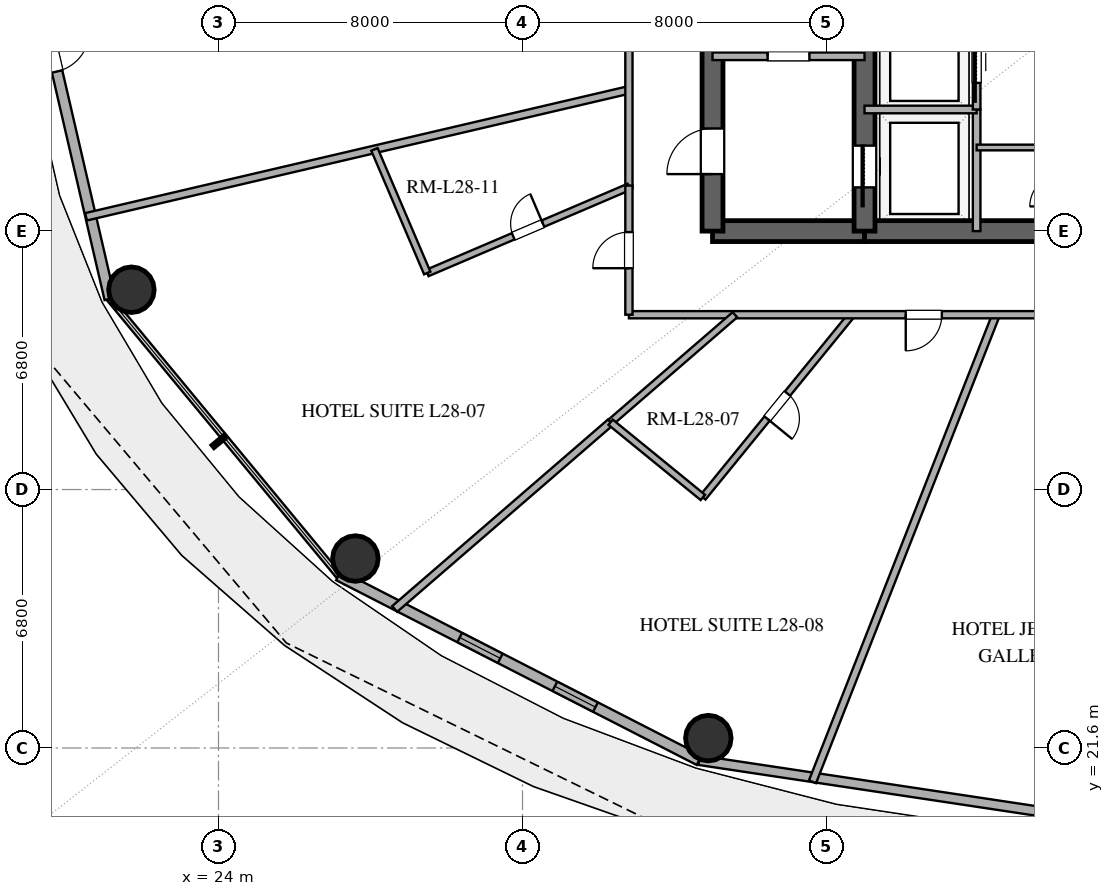
"""IFC4 building model, lengths in metres.
Left out: names, types, materials, properties, quantities, classifications, styles, units other than length and angle.
Written with IfcOpenShell. Run it as: python <this file> out.ifc"""

import sys

from ifc_helpers import new_model, si_unit, direction, frame, frame_2d, origin, origin_2d, place, context, subcontext, project, spatial, rectangle, hollow_circle, extrude, element, fill, save


model = new_model("IFC4")
c1 = context("Model", 3, precision=1e-05, world=origin(), true_north=direction((0.0, 1.0)))
c2 = subcontext(c1, "Body", "Model", "MODEL_VIEW")
j1 = project(units=[si_unit("LENGTHUNIT", "METRE"), si_unit("PLANEANGLEUNIT", "RADIAN")], contexts=[c1])
p1 = place(None, origin())
s1 = spatial("IfcSite", under=j1, at=p1, CompositionType="ELEMENT")
p2 = place(p1, origin())
s2 = spatial("IfcBuilding", under=s1, at=p2, CompositionType="ELEMENT")
p3 = place(p2, frame((0.0, 0.0, 112.8)))
s3 = spatial("IfcBuildingStorey", under=s2, at=p3, CompositionType="ELEMENT", Elevation=112.8)
p4 = place(p3, frame((37.0, 35.2, 0.0), z_axis=(0.0, 0.0, 1.0), x_axis=(1.0, 0.0, 0.0)))
e1 = element("IfcWall", 1, at=p4, inside=s3, PredefinedType="SHEAR", context=c2, shape_type="SweptSolid", body=[
    extrude(rectangle(XDim=4.0, YDim=0.55, at=frame_2d((2.0, 0.0))), origin(), (0.0, 0.0, 1.0), 3.38),
])
p5 = place(p3, frame((41.0, 35.2, 0.0), z_axis=(0.0, 0.0, 1.0), x_axis=(1.0, 0.0, 0.0)))
e2 = element("IfcWall", 2, at=p5, inside=s3, PredefinedType="SHEAR", context=c2, shape_type="SweptSolid", body=[
    extrude(rectangle(XDim=14.0, YDim=0.55, at=frame_2d((7.0, 0.0))), origin(), (0.0, 0.0, 1.0), 3.38),
])
p6 = place(p5, frame((6.1, 0.0, 0.0)))
e3 = element("IfcOpeningElement", 3, at=p6, cuts=e2, PredefinedType="OPENING", context=c2, shape_type="SweptSolid", body=[
    extrude(rectangle(XDim=1.8, YDim=2.25, at=frame_2d((0.9, 1.125))), frame((0.0, 0.285, 0.0), z_axis=(0.0, -1.0, 0.0), x_axis=(1.0, 0.0, 0.0)), (0.0, 0.0, 1.0), 0.57),
])
p7 = place(p3, frame((37.0, 35.2, 0.0), z_axis=(0.0, 0.0, 1.0), x_axis=(0.0, 1.0, 0.0)))
e4 = element("IfcWall", 4, at=p7, inside=s3, PredefinedType="SHEAR", context=c2, shape_type="SweptSolid", body=[
    extrude(rectangle(XDim=13.6, YDim=0.55, at=frame_2d((6.8, 0.0))), origin(), (0.0, 0.0, 1.0), 3.38),
])
p8 = place(p7, frame((1.5, 0.0, 0.0)))
e5 = element("IfcOpeningElement", 5, at=p8, cuts=e4, PredefinedType="OPENING", context=c2, shape_type="SweptSolid", body=[
    extrude(rectangle(XDim=1.2, YDim=2.15, at=frame_2d((0.6, 1.075))), frame((0.0, 0.285, 0.0), z_axis=(0.0, -1.0, 0.0), x_axis=(1.0, 0.0, 0.0)), (0.0, 0.0, 1.0), 0.57),
])
p9 = place(p3, frame((41.0, 35.2, 0.0), z_axis=(0.0, 0.0, 1.0), x_axis=(0.0, 1.0, 0.0)))
e6 = element("IfcWall", 6, at=p9, inside=s3, PredefinedType="SHEAR", context=c2, shape_type="SweptSolid", body=[
    extrude(rectangle(XDim=13.6, YDim=0.55, at=frame_2d((6.8, 0.0))), origin(), (0.0, 0.0, 1.0), 3.38),
])
p10 = place(p9, frame((1.15, 0.0, 0.0)))
e7 = element("IfcOpeningElement", 7, at=p10, cuts=e6, PredefinedType="OPENING", context=c2, shape_type="SweptSolid", body=[
    extrude(rectangle(XDim=1.1, YDim=2.2, at=frame_2d((0.55, 1.1))), frame((0.0, 0.285, 0.0), z_axis=(0.0, -1.0, 0.0), x_axis=(1.0, 0.0, 0.0)), (0.0, 0.0, 1.0), 0.57),
])
for number, where, z_axis, x_axis in (
    (8, (21.709, 33.657, 0.0), (0.0, 0.0, 1.0), (1.0, 0.0, 0.0)),
    (9, (27.602, 26.585, 0.0), (0.0, 0.0, 1.0), (1.0, 0.0, 0.0)),
    (10, (36.89, 21.859, 0.0), (0.0, 0.0, 1.0), (1.0, 0.0, 0.0)),
):
    element("IfcColumn", number, at=place(p3, frame(where, z_axis=z_axis, x_axis=x_axis)), inside=s3, PredefinedType="COLUMN", context=c2, shape_type="SweptSolid", body=[
        extrude(hollow_circle(Radius=0.6, WallThickness=0.032, at=origin_2d()), origin(), (0.0, 0.0, 1.0), 3.38),
    ])
p11 = place(p3, frame((19.151, 42.0, 0.0), z_axis=(0.0, 0.0, 1.0), x_axis=(0.22558597182, -0.974223264616, 0.0)))
e11 = element("IfcWall", 11, at=p11, inside=s3, PredefinedType="SOLIDWALL", context=c2, shape_type="SweptSolid", body=[
    extrude(rectangle(XDim=8.811, YDim=0.28, at=frame_2d((4.405, 0.0))), origin(), (0.0, 0.0, 1.0), 3.38),
])
p12 = place(p11, frame((1.568, 0.0, 0.0)))
e12 = element("IfcOpeningElement", 12, at=p12, cuts=e11, PredefinedType="OPENING", context=c2, shape_type="SweptSolid", body=[
    extrude(rectangle(XDim=1.1, YDim=2.25, at=frame_2d((0.55, 1.125))), frame((0.0, 0.15, 0.0), z_axis=(0.0, -1.0, 0.0), x_axis=(1.0, 0.0, 0.0)), (0.0, 0.0, 1.0), 0.3),
])
p13 = place(p3, frame((27.16, 26.14, 0.0), z_axis=(0.0, 0.0, 1.0), x_axis=(0.889959505023, -0.45603955905, 0.0)))
e13 = element("IfcWall", 13, at=p13, inside=s3, PredefinedType="SOLIDWALL", context=c2, shape_type="SweptSolid", body=[
    extrude(rectangle(XDim=10.662, YDim=0.28, at=frame_2d((5.331, 0.0))), origin(), (0.0, 0.0, 1.0), 3.38),
])
p14 = place(p13, frame((3.581, 0.0, 0.85)))
e14 = element("IfcOpeningElement", 14, at=p14, cuts=e13, PredefinedType="OPENING", context=c2, shape_type="SweptSolid", body=[
    extrude(rectangle(XDim=1.2, YDim=1.6, at=frame_2d((0.6, 0.8))), frame((0.0, 0.15, 0.0), z_axis=(0.0, -1.0, 0.0), x_axis=(1.0, 0.0, 0.0)), (0.0, 0.0, 1.0), 0.3),
])
p15 = place(p13, frame((6.396, 0.0, 0.85)))
e15 = element("IfcOpeningElement", 15, at=p15, cuts=e13, PredefinedType="OPENING", context=c2, shape_type="SweptSolid", body=[
    extrude(rectangle(XDim=1.2, YDim=1.6, at=frame_2d((0.6, 0.8))), frame((0.0, 0.15, 0.0), z_axis=(0.0, -1.0, 0.0), x_axis=(1.0, 0.0, 0.0)), (0.0, 0.0, 1.0), 0.3),
])
p16 = place(p3, frame((36.649, 21.277, 0.0), z_axis=(0.0, 0.0, 1.0), x_axis=(0.988877774656, -0.148730450117, 0.0)))
e16 = element("IfcWall", 16, at=p16, inside=s3, PredefinedType="SOLIDWALL", context=c2, shape_type="SweptSolid", body=[
    extrude(rectangle(XDim=11.479, YDim=0.25, at=frame_2d((5.74, 0.0))), origin(), (0.0, 0.0, 1.0), 3.38),
])
p17 = place(p3, frame((37.0, 39.8, 0.0), z_axis=(0.0, 0.0, 1.0), x_axis=(1.0, 0.0, 0.0)))
e17 = element("IfcWall", 17, at=p17, inside=s3, PredefinedType="SOLIDWALL", context=c2, shape_type="SweptSolid", body=[
    extrude(rectangle(XDim=4.0, YDim=0.2, at=frame_2d((2.0, 0.0))), origin(), (0.0, 0.0, 1.0), 2.74),
])
p18 = place(p17, frame((1.45, 0.0, 0.0)))
e18 = element("IfcOpeningElement", 18, at=p18, cuts=e17, PredefinedType="OPENING", context=c2, shape_type="SweptSolid", body=[
    extrude(rectangle(XDim=1.1, YDim=2.15, at=frame_2d((0.55, 1.075))), frame((0.0, 0.11, 0.0), z_axis=(0.0, -1.0, 0.0), x_axis=(1.0, 0.0, 0.0)), (0.0, 0.0, 1.0), 0.22),
])
p19 = place(p3, frame((43.95, 35.2, 0.0), z_axis=(0.0, 0.0, 1.0), x_axis=(0.0, 1.0, 0.0)))
e19 = element("IfcWall", 19, at=p19, inside=s3, PredefinedType="SOLIDWALL", context=c2, shape_type="SweptSolid", body=[
    extrude(rectangle(XDim=3.2, YDim=0.2, at=frame_2d((1.6, 0.0))), origin(), (0.0, 0.0, 1.0), 2.74),
])
p20 = place(p3, frame((41.0, 38.4, 0.0), z_axis=(0.0, 0.0, 1.0), x_axis=(1.0, 0.0, 0.0)))
e20 = element("IfcWall", 20, at=p20, inside=s3, PredefinedType="SOLIDWALL", context=c2, shape_type="SweptSolid", body=[
    extrude(rectangle(XDim=2.95, YDim=0.2, at=frame_2d((1.475, 0.0))), origin(), (0.0, 0.0, 1.0), 2.74),
])
p21 = place(p3, frame((43.95, 38.4, 0.0), z_axis=(0.0, 0.0, 1.0), x_axis=(0.0, 1.0, 0.0)))
e21 = element("IfcWall", 21, at=p21, inside=s3, PredefinedType="SOLIDWALL", context=c2, shape_type="SweptSolid", body=[
    extrude(rectangle(XDim=7.8, YDim=0.2, at=frame_2d((3.9, 0.0))), origin(), (0.0, 0.0, 1.0), 2.74),
])
p22 = place(p21, frame((0.7, 0.0, 0.0)))
e22 = element("IfcOpeningElement", 22, at=p22, cuts=e21, PredefinedType="OPENING", context=c2, shape_type="SweptSolid", body=[
    extrude(rectangle(XDim=1.1, YDim=2.2, at=frame_2d((0.55, 1.1))), frame((0.0, 0.11, 0.0), z_axis=(0.0, -1.0, 0.0), x_axis=(1.0, 0.0, 0.0)), (0.0, 0.0, 1.0), 0.22),
])
p23 = place(p21, frame((3.3, 0.0, 0.0)))
e23 = element("IfcOpeningElement", 23, at=p23, cuts=e21, PredefinedType="OPENING", context=c2, shape_type="SweptSolid", body=[
    extrude(rectangle(XDim=1.1, YDim=2.2, at=frame_2d((0.55, 1.1))), frame((0.0, 0.11, 0.0), z_axis=(0.0, -1.0, 0.0), x_axis=(1.0, 0.0, 0.0)), (0.0, 0.0, 1.0), 0.22),
])
p24 = place(p3, frame((43.95, 37.4, 0.0), z_axis=(0.0, 0.0, 1.0), x_axis=(1.0, 0.0, 0.0)))
e24 = element("IfcWall", 24, at=p24, inside=s3, PredefinedType="PARTITIONING", context=c2, shape_type="SweptSolid", body=[
    extrude(rectangle(XDim=2.25, YDim=0.15, at=frame_2d((1.125, 0.0))), origin(), (0.0, 0.0, 1.0), 2.74),
])
p25 = place(p3, frame((39.63, 20.711, 0.0), z_axis=(0.0, 0.0, 1.0), x_axis=(0.365888605627, 0.930658652929, 0.0)))
e25 = element("IfcWall", 25, at=p25, inside=s3, PredefinedType="PARTITIONING", context=c2, shape_type="SweptSolid", body=[
    extrude(rectangle(XDim=13.205, YDim=0.2, at=frame_2d((6.603, 0.0))), origin(), (0.0, 0.0, 1.0), 2.74),
])
p26 = place(p3, frame((34.8, 38.915, 0.0), z_axis=(0.0, 0.0, 1.0), x_axis=(-0.973762218061, -0.227567885864, 0.0)))
e26 = element("IfcWall", 26, at=p26, inside=s3, PredefinedType="PARTITIONING", context=c2, shape_type="SweptSolid", body=[
    extrude(rectangle(XDim=14.67, YDim=0.2, at=frame_2d((7.335, 0.0))), origin(), (0.0, 0.0, 1.0), 2.74),
])
p27 = place(p3, frame((28.636, 25.258, 0.0), z_axis=(0.0, 0.0, 1.0), x_axis=(0.756485284597, 0.654010714124, 0.0)))
e27 = element("IfcWall", 27, at=p27, inside=s3, PredefinedType="PARTITIONING", context=c2, shape_type="SweptSolid", body=[
    extrude(rectangle(XDim=7.512, YDim=0.2, at=frame_2d((3.756, 0.0))), origin(), (0.0, 0.0, 1.0), 2.74),
])
p28 = place(p3, frame((34.8, 36.329, 0.0), z_axis=(0.0, 0.0, 1.0), x_axis=(0.0, 1.0, 0.0)))
e28 = element("IfcWall", 28, at=p28, inside=s3, PredefinedType="PARTITIONING", context=c2, shape_type="SweptSolid", body=[
    extrude(rectangle(XDim=14.671, YDim=0.19, at=frame_2d((7.336, 0.0))), origin(), (0.0, 0.0, 1.0), 2.74),
])
p29 = place(p28, frame((5.341, 0.0, 0.0)))
e29 = element("IfcOpeningElement", 29, at=p29, cuts=e28, PredefinedType="OPENING", context=c2, shape_type="SweptSolid", body=[
    extrude(rectangle(XDim=1.0, YDim=2.2, at=frame_2d((0.5, 1.1))), frame((0.0, 0.105, 0.0), z_axis=(0.0, -1.0, 0.0), x_axis=(1.0, 0.0, 0.0)), (0.0, 0.0, 1.0), 0.21),
])
p30 = place(p28, frame((11.076, 0.0, 0.0)))
e30 = element("IfcOpeningElement", 30, at=p30, cuts=e28, PredefinedType="OPENING", context=c2, shape_type="SweptSolid", body=[
    extrude(rectangle(XDim=0.95, YDim=2.15, at=frame_2d((0.475, 1.075))), frame((0.0, 0.105, 0.0), z_axis=(0.0, -1.0, 0.0), x_axis=(1.0, 0.0, 0.0)), (0.0, 0.0, 1.0), 0.21),
])
p31 = place(p3, frame((40.664, 33.0, 0.0), z_axis=(0.0, 0.0, 1.0), x_axis=(-0.631841179317, -0.775097880347, 0.0)))
e31 = element("IfcWall", 31, at=p31, inside=s3, PredefinedType="PLUMBINGWALL", context=c2, shape_type="SweptSolid", body=[
    extrude(rectangle(XDim=6.202, YDim=0.18, at=frame_2d((3.101, 0.0))), origin(), (0.0, 0.0, 1.0), 2.74),
])
p32 = place(p31, frame((2.676, 0.0, 0.0)))
e32 = element("IfcOpeningElement", 32, at=p32, cuts=e31, PredefinedType="OPENING", context=c2, shape_type="SweptSolid", body=[
    extrude(rectangle(XDim=0.85, YDim=2.1, at=frame_2d((0.425, 1.05))), frame((0.0, 0.1, 0.0), z_axis=(0.0, -1.0, 0.0), x_axis=(1.0, 0.0, 0.0)), (0.0, 0.0, 1.0), 0.2),
])
p33 = place(p3, frame((29.493, 34.097, 0.0), z_axis=(0.0, 0.0, 1.0), x_axis=(0.919684682014, 0.392657720755, 0.0)))
e33 = element("IfcWall", 33, at=p33, inside=s3, PredefinedType="PLUMBINGWALL", context=c2, shape_type="SweptSolid", body=[
    extrude(rectangle(XDim=5.771, YDim=0.18, at=frame_2d((2.885, 0.0))), origin(), (0.0, 0.0, 1.0), 2.74),
])
p34 = place(p33, frame((2.46, 0.0, 0.0)))
e34 = element("IfcOpeningElement", 34, at=p34, cuts=e33, PredefinedType="OPENING", context=c2, shape_type="SweptSolid", body=[
    extrude(rectangle(XDim=0.85, YDim=2.1, at=frame_2d((0.425, 1.05))), frame((0.0, 0.1, 0.0), z_axis=(0.0, -1.0, 0.0), x_axis=(1.0, 0.0, 0.0)), (0.0, 0.0, 1.0), 0.2),
])
p35 = place(p3, frame((50.648, 33.0, 0.0), z_axis=(0.0, 0.0, 1.0), x_axis=(-1.0, 0.0, 0.0)))
e35 = element("IfcWall", 35, at=p35, inside=s3, PredefinedType="PARTITIONING", context=c2, shape_type="SweptSolid", body=[
    extrude(rectangle(XDim=15.848, YDim=0.19, at=frame_2d((7.924, 0.0))), origin(), (0.0, 0.0, 1.0), 2.74),
])
p36 = place(p35, frame((3.427, 0.0, 0.0)))
e36 = element("IfcOpeningElement", 36, at=p36, cuts=e35, PredefinedType="OPENING", context=c2, shape_type="SweptSolid", body=[
    extrude(rectangle(XDim=1.0, YDim=2.2, at=frame_2d((0.5, 1.1))), frame((0.0, 0.105, 0.0), z_axis=(0.0, -1.0, 0.0), x_axis=(1.0, 0.0, 0.0)), (0.0, 0.0, 1.0), 0.21),
])
p37 = place(p35, frame((7.614, 0.0, 0.0)))
e37 = element("IfcOpeningElement", 37, at=p37, cuts=e35, PredefinedType="OPENING", context=c2, shape_type="SweptSolid", body=[
    extrude(rectangle(XDim=0.95, YDim=2.15, at=frame_2d((0.475, 1.075))), frame((0.0, 0.105, 0.0), z_axis=(0.0, -1.0, 0.0), x_axis=(1.0, 0.0, 0.0)), (0.0, 0.0, 1.0), 0.21),
])
p38 = place(p3, frame((34.319, 30.171, 0.0), z_axis=(0.0, 0.0, 1.0), x_axis=(0.756448461864, 0.654053304053, 0.0)))
e38 = element("IfcWall", 38, at=p38, inside=s3, PredefinedType="PLUMBINGWALL", context=c2, shape_type="SweptSolid", body=[
    extrude(rectangle(XDim=4.325, YDim=0.18, at=frame_2d((2.163, 0.0))), origin(), (0.0, 0.0, 1.0), 2.74),
])
p39 = place(p3, frame((28.104, 37.35, 0.0), z_axis=(0.0, 0.0, 1.0), x_axis=(0.392677696951, -0.919676152957, 0.0)))
e39 = element("IfcWall", 39, at=p39, inside=s3, PredefinedType="PLUMBINGWALL", context=c2, shape_type="SweptSolid", body=[
    extrude(rectangle(XDim=3.537, YDim=0.18, at=frame_2d((1.769, 0.0))), origin(), (0.0, 0.0, 1.0), 2.74),
])
p40 = place(p3, frame((34.8, 33.0, 0.0), z_axis=(0.0, 0.0, 1.0), x_axis=(0.0, 1.0, 0.0)))
e40 = element("IfcWall", 40, at=p40, inside=s3, PredefinedType="PARTITIONING", context=c2, shape_type="SweptSolid", body=[
    extrude(rectangle(XDim=3.398, YDim=0.19, at=frame_2d((1.699, 0.0))), origin(), (0.0, 0.0, 1.0), 2.74),
])
p41 = place(p40, frame((1.224, 0.0, 0.0)))
e41 = element("IfcOpeningElement", 41, at=p41, cuts=e40, PredefinedType="OPENING", context=c2, shape_type="SweptSolid", body=[
    extrude(rectangle(XDim=0.95, YDim=2.15, at=frame_2d((0.475, 1.075))), frame((0.0, 0.105, 0.0), z_axis=(0.0, -1.0, 0.0), x_axis=(1.0, 0.0, 0.0)), (0.0, 0.0, 1.0), 0.21),
])
p42 = place(p3, frame((36.745, 28.193, 0.0), z_axis=(0.0, 0.0, 1.0), x_axis=(-0.775130314585, 0.631801389212, 0.0)))
e42 = element("IfcWall", 42, at=p42, inside=s3, PredefinedType="PLUMBINGWALL", context=c2, shape_type="SweptSolid", body=[
    extrude(rectangle(XDim=3.131, YDim=0.18, at=frame_2d((1.565, 0.0))), origin(), (0.0, 0.0, 1.0), 2.74),
])
p43 = place(p12, origin())
e43 = element("IfcDoor", 43, at=p43, inside=s3, OperationType="SINGLE_SWING_LEFT", PredefinedType="DOOR", context=c2, shape_type="SweptSolid", body=[
    extrude(rectangle(XDim=1.1, YDim=2.25, at=frame_2d((0.55, 1.125))), frame((0.0, 0.025, 0.0), z_axis=(0.0, -1.0, 0.0), x_axis=(1.0, 0.0, 0.0)), (0.0, 0.0, 1.0), 0.05),
])
fill(e12, e43)
p44 = place(p14, origin())
e44 = element("IfcWindow", 44, at=p44, inside=s3, PartitioningType="SINGLE_PANEL", PredefinedType="WINDOW", context=c2, shape_type="SweptSolid", body=[
    extrude(rectangle(XDim=1.2, YDim=1.6, at=frame_2d((0.6, 0.8))), frame((0.0, 0.03, 0.0), z_axis=(0.0, -1.0, 0.0), x_axis=(1.0, 0.0, 0.0)), (0.0, 0.0, 1.0), 0.06),
])
fill(e14, e44)
p45 = place(p15, origin())
e45 = element("IfcWindow", 45, at=p45, inside=s3, PartitioningType="SINGLE_PANEL", PredefinedType="WINDOW", context=c2, shape_type="SweptSolid", body=[
    extrude(rectangle(XDim=1.2, YDim=1.6, at=frame_2d((0.6, 0.8))), frame((0.0, 0.03, 0.0), z_axis=(0.0, -1.0, 0.0), x_axis=(1.0, 0.0, 0.0)), (0.0, 0.0, 1.0), 0.06),
])
fill(e15, e45)
p46 = place(p10, origin())
e46 = element("IfcDoor", 46, at=p46, inside=s3, OperationType="SLIDING_TO_LEFT", PredefinedType="DOOR", context=c2, shape_type="SweptSolid", body=[
    extrude(rectangle(XDim=1.1, YDim=2.2, at=frame_2d((0.55, 1.1))), frame((0.0, 0.025, 0.0), z_axis=(0.0, -1.0, 0.0), x_axis=(1.0, 0.0, 0.0)), (0.0, 0.0, 1.0), 0.05),
])
fill(e7, e46)
p47 = place(p8, origin())
e47 = element("IfcDoor", 47, at=p47, inside=s3, OperationType="SINGLE_SWING_LEFT", PredefinedType="DOOR", context=c2, shape_type="SweptSolid", body=[
    extrude(rectangle(XDim=1.2, YDim=2.15, at=frame_2d((0.6, 1.075))), frame((0.0, 0.025, 0.0), z_axis=(0.0, -1.0, 0.0), x_axis=(1.0, 0.0, 0.0)), (0.0, 0.0, 1.0), 0.05),
])
fill(e5, e47)
p48 = place(p18, origin())
e48 = element("IfcDoor", 48, at=p48, inside=s3, OperationType="SINGLE_SWING_LEFT", PredefinedType="DOOR", context=c2, shape_type="SweptSolid", body=[
    extrude(rectangle(XDim=1.1, YDim=2.15, at=frame_2d((0.55, 1.075))), frame((0.0, 0.025, 0.0), z_axis=(0.0, -1.0, 0.0), x_axis=(1.0, 0.0, 0.0)), (0.0, 0.0, 1.0), 0.05),
])
fill(e18, e48)
p49 = place(p22, origin())
e49 = element("IfcDoor", 49, at=p49, inside=s3, OperationType="SLIDING_TO_LEFT", PredefinedType="DOOR", context=c2, shape_type="SweptSolid", body=[
    extrude(rectangle(XDim=1.1, YDim=2.2, at=frame_2d((0.55, 1.1))), frame((0.0, 0.025, 0.0), z_axis=(0.0, -1.0, 0.0), x_axis=(1.0, 0.0, 0.0)), (0.0, 0.0, 1.0), 0.05),
])
fill(e22, e49)
p50 = place(p32, origin())
e50 = element("IfcDoor", 50, at=p50, inside=s3, OperationType="SINGLE_SWING_RIGHT", PredefinedType="DOOR", context=c2, shape_type="SweptSolid", body=[
    extrude(rectangle(XDim=0.85, YDim=2.1, at=frame_2d((0.425, 1.05))), frame((0.0, 0.025, 0.0), z_axis=(0.0, -1.0, 0.0), x_axis=(1.0, 0.0, 0.0)), (0.0, 0.0, 1.0), 0.05),
])
fill(e32, e50)
p51 = place(p34, origin())
e51 = element("IfcDoor", 51, at=p51, inside=s3, OperationType="SINGLE_SWING_RIGHT", PredefinedType="DOOR", context=c2, shape_type="SweptSolid", body=[
    extrude(rectangle(XDim=0.85, YDim=2.1, at=frame_2d((0.425, 1.05))), frame((0.0, 0.025, 0.0), z_axis=(0.0, -1.0, 0.0), x_axis=(1.0, 0.0, 0.0)), (0.0, 0.0, 1.0), 0.05),
])
fill(e34, e51)
p52 = place(p37, origin())
e52 = element("IfcDoor", 52, at=p52, inside=s3, OperationType="SINGLE_SWING_RIGHT", PredefinedType="DOOR", context=c2, shape_type="SweptSolid", body=[
    extrude(rectangle(XDim=0.95, YDim=2.15, at=frame_2d((0.475, 1.075))), frame((0.0, 0.025, 0.0), z_axis=(0.0, -1.0, 0.0), x_axis=(1.0, 0.0, 0.0)), (0.0, 0.0, 1.0), 0.05),
])
fill(e37, e52)
p53 = place(p41, origin())
e53 = element("IfcDoor", 53, at=p53, inside=s3, OperationType="SINGLE_SWING_LEFT", PredefinedType="DOOR", context=c2, shape_type="SweptSolid", body=[
    extrude(rectangle(XDim=0.95, YDim=2.15, at=frame_2d((0.475, 1.075))), frame((0.0, 0.025, 0.0), z_axis=(0.0, -1.0, 0.0), x_axis=(1.0, 0.0, 0.0)), (0.0, 0.0, 1.0), 0.05),
])
fill(e41, e53)
save(model, sys.argv[1])
